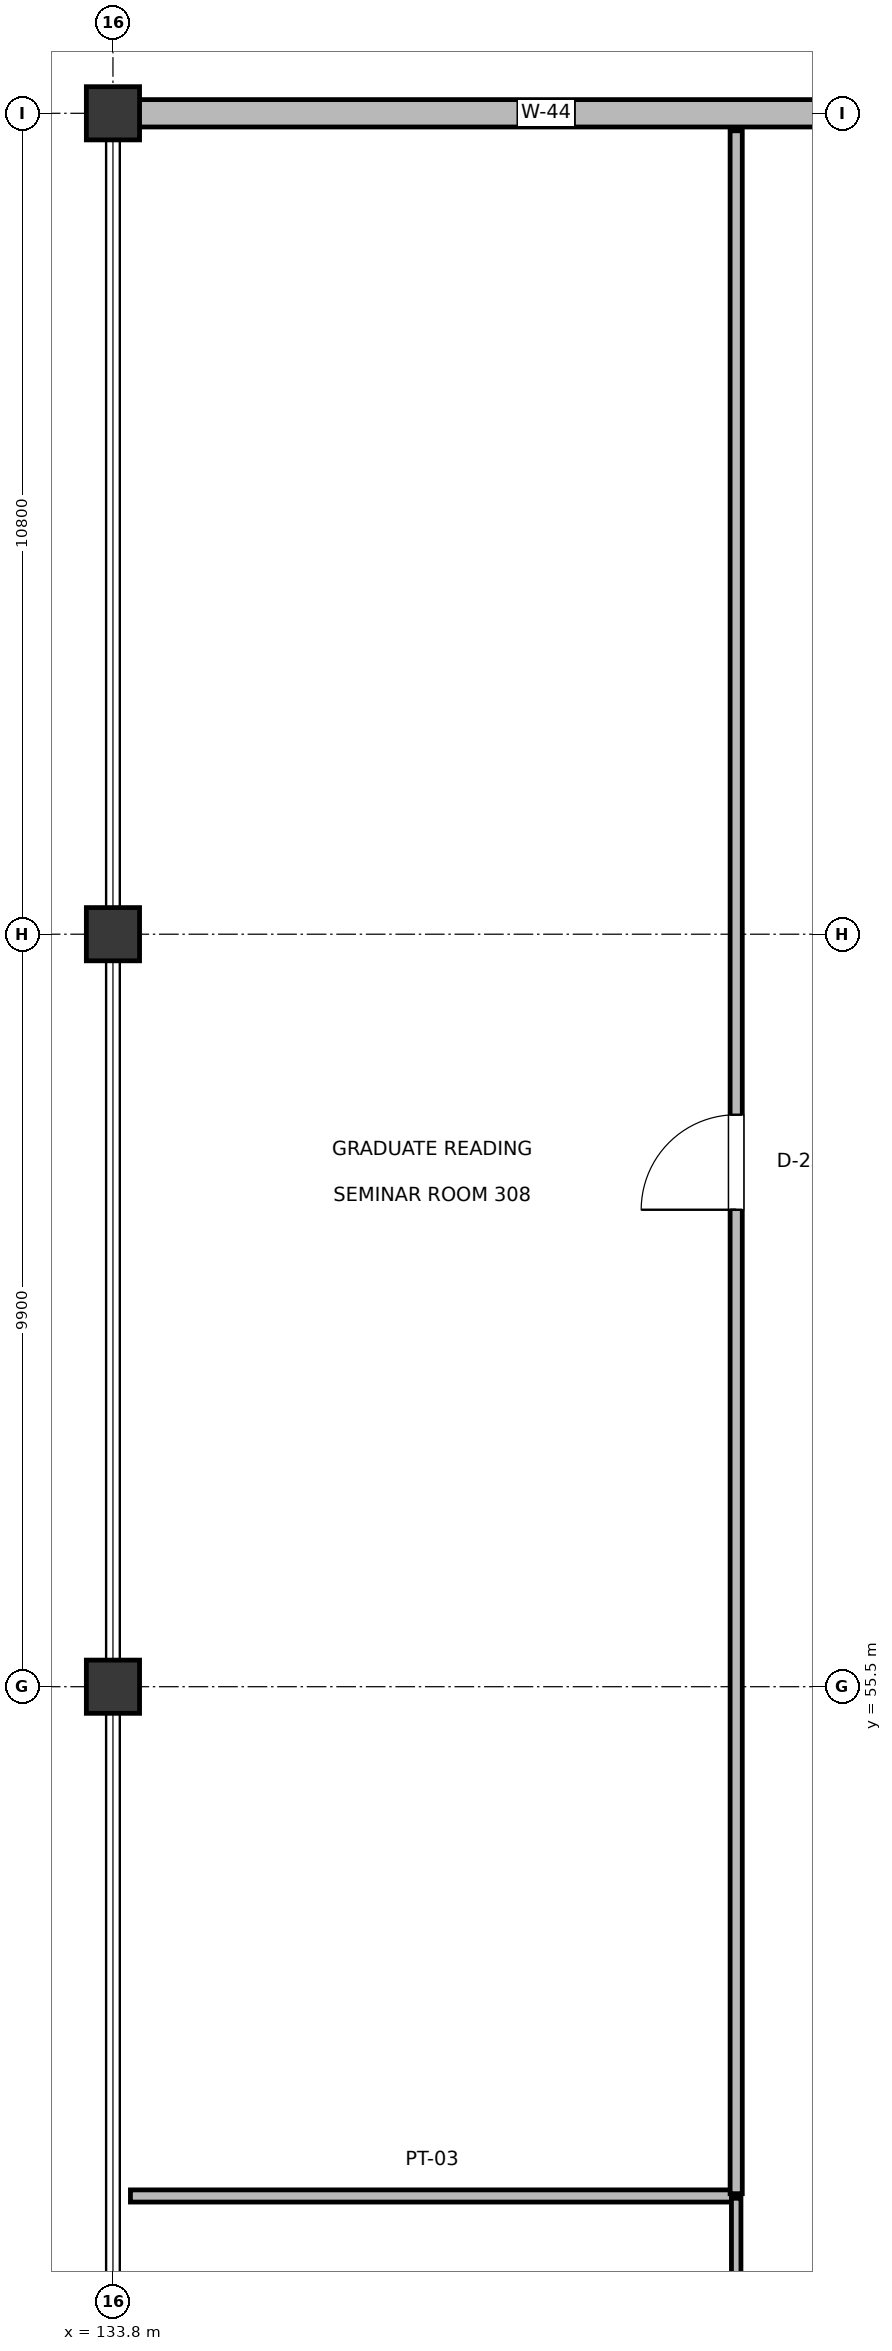
"""IFC4 building model, lengths in metres.
Left out: names, types, materials, properties, quantities, classifications, styles, units other than length and angle.
Written with IfcOpenShell. Run it as: python <this file> out.ifc"""

import sys

from ifc_helpers import new_model, si_unit, direction, frame, frame_2d, origin, origin_2d, place, context, subcontext, project, spatial, rectangle, extrude, element, fill, save


model = new_model("IFC4")
c1 = context("Model", 3, precision=1e-05, world=origin(), true_north=direction((0.0, 1.0)))
c2 = subcontext(c1, "Body", "Model", "MODEL_VIEW")
j1 = project(units=[si_unit("LENGTHUNIT", "METRE"), si_unit("PLANEANGLEUNIT", "RADIAN")], contexts=[c1])
p1 = place(None, origin())
s1 = spatial("IfcSite", under=j1, at=p1, CompositionType="ELEMENT")
p2 = place(p1, origin())
s2 = spatial("IfcBuilding", under=s1, at=p2, CompositionType="ELEMENT")
p3 = place(p2, frame((0.0, 0.0, 15.0)))
s3 = spatial("IfcBuildingStorey", under=s2, at=p3, CompositionType="ELEMENT", Elevation=15.0)
for number, where, z_axis, x_axis in (
    (1, (133.8, 55.5, 0.0), (0.0, 0.0, 1.0), (1.0, 0.0, 0.0)),
    (2, (133.8, 65.4, 0.0), (0.0, 0.0, 1.0), (1.0, 0.0, 0.0)),
    (3, (133.8, 76.2, 0.0), (0.0, 0.0, 1.0), (1.0, 0.0, 0.0)),
):
    element("IfcColumn", number, at=place(p3, frame(where, z_axis=z_axis, x_axis=x_axis)), inside=s3, PredefinedType="COLUMN", context=c2, shape_type="SweptSolid", body=[
        extrude(rectangle(XDim=0.7, YDim=0.7, at=origin_2d()), origin(), (0.0, 0.0, 1.0), 4.5),
    ])
p4 = place(p3, frame((134.135, 76.2, 0.0), z_axis=(0.0, 0.0, 1.0), x_axis=(1.0, 0.0, 0.0)))
e4 = element("IfcWall", 4, at=p4, inside=s3, PredefinedType="SOLIDWALL", context=c2, shape_type="SweptSolid", body=[
    extrude(rectangle(XDim=10.73, YDim=0.36, at=frame_2d((5.365, 0.0))), origin(), (0.0, 0.0, 1.0), 3.405),
])
p5 = place(p4, frame((4.99, 0.0, 0.85)))
e5 = element("IfcOpeningElement", 5, at=p5, cuts=e4, PredefinedType="OPENING", context=c2, shape_type="SweptSolid", body=[
    extrude(rectangle(XDim=0.75, YDim=1.75, at=frame_2d((0.375, 0.875))), frame((0.0, 0.19, 0.0), z_axis=(0.0, -1.0, 0.0), x_axis=(1.0, 0.0, 0.0)), (0.0, 0.0, 1.0), 0.38),
])
p6 = place(p3, frame((134.03, 48.8, 0.0), z_axis=(0.0, 0.0, 1.0), x_axis=(1.0, 0.0, 0.0)))
e6 = element("IfcWall", 6, at=p6, inside=s3, PredefinedType="PARTITIONING", context=c2, shape_type="SweptSolid", body=[
    extrude(rectangle(XDim=7.94, YDim=0.16, at=frame_2d((3.97, 0.0))), origin(), (0.0, 0.0, 1.0), 3.355),
])
p7 = place(p3, frame((142.0, 24.03, 0.0), z_axis=(0.0, 0.0, 1.0), x_axis=(0.0, 1.0, 0.0)))
e7 = element("IfcWall", 7, at=p7, inside=s3, PredefinedType="PARTITIONING", context=c2, shape_type="SweptSolid", body=[
    extrude(rectangle(XDim=24.74, YDim=0.125, at=frame_2d((12.37, 0.0))), origin(), (0.0, 0.0, 1.0), 3.385),
])
p8 = place(p7, frame((11.72, 0.0, 0.0)))
e8 = element("IfcOpeningElement", 8, at=p8, cuts=e7, PredefinedType="OPENING", context=c2, shape_type="SweptSolid", body=[
    extrude(rectangle(XDim=1.3, YDim=2.2, at=frame_2d((0.65, 1.1))), frame((0.0, 0.073, 0.0), z_axis=(0.0, -1.0, 0.0), x_axis=(1.0, 0.0, 0.0)), (0.0, 0.0, 1.0), 0.145),
])
p9 = place(p3, frame((142.0, 48.83, 0.0), z_axis=(0.0, 0.0, 1.0), x_axis=(0.0, 1.0, 0.0)))
e9 = element("IfcWall", 9, at=p9, inside=s3, PredefinedType="PARTITIONING", context=c2, shape_type="SweptSolid", body=[
    extrude(rectangle(XDim=27.14, YDim=0.16, at=frame_2d((13.57, 0.0))), origin(), (0.0, 0.0, 1.0), 3.405),
])
p10 = place(p9, frame((12.945, 0.0, 0.0)))
e10 = element("IfcOpeningElement", 10, at=p10, cuts=e9, PredefinedType="OPENING", context=c2, shape_type="SweptSolid", body=[
    extrude(rectangle(XDim=1.25, YDim=2.2, at=frame_2d((0.625, 1.1))), frame((0.0, 0.09, 0.0), z_axis=(0.0, -1.0, 0.0), x_axis=(1.0, 0.0, 0.0)), (0.0, 0.0, 1.0), 0.18),
])
p11 = place(p5, origin())
e11 = element("IfcWindow", 11, at=p11, inside=s3, PartitioningType="DOUBLE_PANEL_VERTICAL", PredefinedType="WINDOW", context=c2, shape_type="SweptSolid", body=[
    extrude(rectangle(XDim=0.75, YDim=1.75, at=frame_2d((0.375, 0.875))), frame((0.0, 0.03, 0.0), z_axis=(0.0, -1.0, 0.0), x_axis=(1.0, 0.0, 0.0)), (0.0, 0.0, 1.0), 0.06),
])
fill(e5, e11)
p12 = place(p10, origin())
e12 = element("IfcDoor", 12, at=p12, inside=s3, OperationType="SINGLE_SWING_LEFT", PredefinedType="DOOR", context=c2, shape_type="SweptSolid", body=[
    extrude(rectangle(XDim=1.25, YDim=2.2, at=frame_2d((0.625, 1.1))), frame((0.0, 0.025, 0.0), z_axis=(0.0, -1.0, 0.0), x_axis=(1.0, 0.0, 0.0)), (0.0, 0.0, 1.0), 0.05),
])
fill(e10, e12)
save(model, sys.argv[1])
